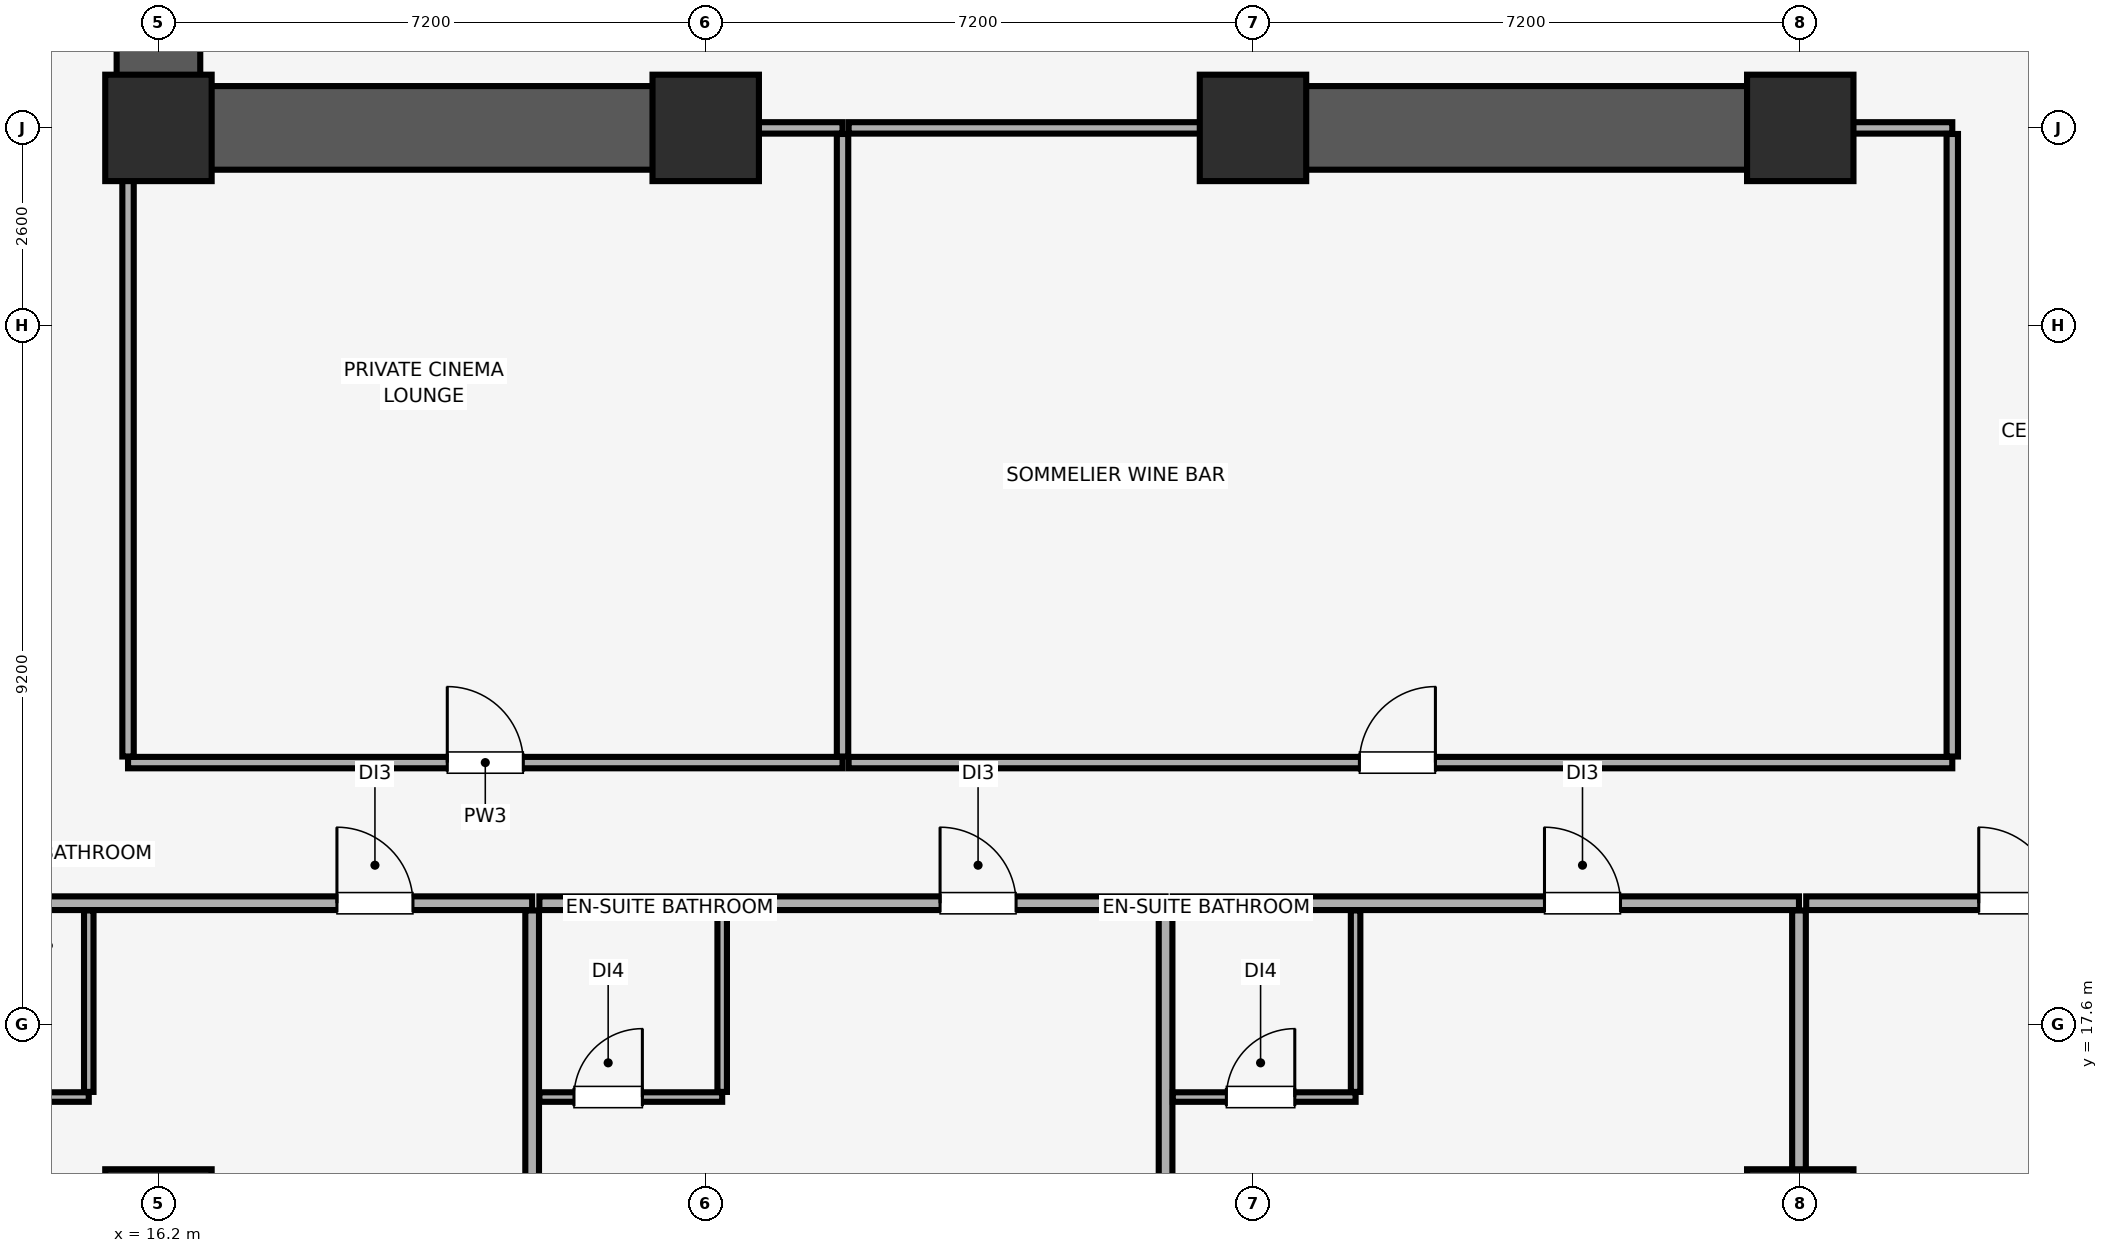
"""IFC4 building model, lengths in metres.
Left out: names, types, materials, properties, quantities, classifications, styles, units other than length and angle.
Written with IfcOpenShell. Run it as: python <this file> out.ifc"""

import sys

from ifc_helpers import new_model, si_unit, direction, frame, frame_2d, origin, origin_2d, place, context, subcontext, project, spatial, rectangle, extrude, element, fill, save


model = new_model("IFC4")
c1 = context("Model", 3, precision=1e-05, world=origin(), true_north=direction((0.0, 1.0)))
c2 = subcontext(c1, "Body", "Model", "MODEL_VIEW")
j1 = project(units=[si_unit("LENGTHUNIT", "METRE"), si_unit("PLANEANGLEUNIT", "RADIAN")], contexts=[c1])
p1 = place(None, origin())
s1 = spatial("IfcSite", under=j1, at=p1, CompositionType="ELEMENT")
p2 = place(p1, origin())
s2 = spatial("IfcBuilding", under=s1, at=p2, CompositionType="ELEMENT")
p3 = place(p2, frame((0.0, 0.0, 72.65)))
s3 = spatial("IfcBuildingStorey", under=s2, at=p3, CompositionType="ELEMENT", Elevation=72.65)
for number, where, z_axis, x_axis in (
    (1, (16.2, 15.0, 0.0), (0.0, 0.0, 1.0), (1.0, 0.0, 0.0)),
    (2, (37.8, 15.0, 0.0), (0.0, 0.0, 1.0), (1.0, 0.0, 0.0)),
    (3, (16.2, 29.4, 0.0), (0.0, 0.0, 1.0), (1.0, 0.0, 0.0)),
    (4, (23.4, 29.4, 0.0), (0.0, 0.0, 1.0), (1.0, 0.0, 0.0)),
    (5, (30.6, 29.4, 0.0), (0.0, 0.0, 1.0), (1.0, 0.0, 0.0)),
    (6, (37.8, 29.4, 0.0), (0.0, 0.0, 1.0), (1.0, 0.0, 0.0)),
):
    element("IfcColumn", number, at=place(p3, frame(where, z_axis=z_axis, x_axis=x_axis)), inside=s3, PredefinedType="COLUMN", context=c2, shape_type="SweptSolid", body=[
        extrude(rectangle(XDim=1.4, YDim=1.4, at=origin_2d()), origin(), (0.0, 0.0, 1.0), 3.51),
    ])
p4 = place(p3, frame((16.2, 29.4, 0.0), z_axis=(0.0, 0.0, 1.0), x_axis=(0.0, 1.0, 0.0)))
e7 = element("IfcWall", 7, at=p4, inside=s3, PredefinedType="SHEAR", context=c2, shape_type="SweptSolid", body=[
    extrude(rectangle(XDim=19.2, YDim=1.1, at=frame_2d((9.6, 0.0))), origin(), (0.0, 0.0, 1.0), 3.51),
])
p5 = place(p3, frame((16.755, 29.4, 0.0), z_axis=(0.0, 0.0, 1.0), x_axis=(1.0, 0.0, 0.0)))
e8 = element("IfcWall", 8, at=p5, inside=s3, PredefinedType="SHEAR", context=c2, shape_type="SweptSolid", body=[
    extrude(rectangle(XDim=6.845, YDim=1.1, at=frame_2d((3.423, 0.0))), origin(), (0.0, 0.0, 1.0), 3.51),
])
p6 = place(p3, frame((30.4, 29.4, 0.0), z_axis=(0.0, 0.0, 1.0), x_axis=(1.0, 0.0, 0.0)))
e9 = element("IfcWall", 9, at=p6, inside=s3, PredefinedType="SHEAR", context=c2, shape_type="SweptSolid", body=[
    extrude(rectangle(XDim=7.6, YDim=1.1, at=frame_2d((3.8, 0.0))), origin(), (0.0, 0.0, 1.0), 3.51),
])
p7 = place(p3, frame((12.878, 19.2, 0.0), z_axis=(0.0, 0.0, 1.0), x_axis=(1.0, 0.0, 0.0)))
e10 = element("IfcWall", 10, at=p7, inside=s3, PredefinedType="PARTITIONING", context=c2, shape_type="SweptSolid", body=[
    extrude(rectangle(XDim=8.238, YDim=0.18, at=frame_2d((4.119, 0.0))), origin(), (0.0, 0.0, 1.0), 3.51),
])
p8 = place(p7, frame((5.67, 0.0, 0.0)))
e11 = element("IfcOpeningElement", 11, at=p8, cuts=e10, PredefinedType="OPENING", context=c2, shape_type="SweptSolid", body=[
    extrude(rectangle(XDim=1.0, YDim=2.15, at=frame_2d((0.5, 1.075))), frame((0.0, 0.1, 0.0), z_axis=(0.0, -1.0, 0.0), x_axis=(1.0, 0.0, 0.0)), (0.0, 0.0, 1.0), 0.2),
])
p9 = place(p3, frame((21.117, 0.15, 0.0), z_axis=(0.0, 0.0, 1.0), x_axis=(0.0, 1.0, 0.0)))
e12 = element("IfcWall", 12, at=p9, inside=s3, PredefinedType="PARTITIONING", context=c2, shape_type="SweptSolid", body=[
    extrude(rectangle(XDim=18.955, YDim=0.18, at=frame_2d((9.478, 0.0))), origin(), (0.0, 0.0, 1.0), 3.51),
])
p10 = place(p3, frame((12.878, 16.65, 0.0), z_axis=(0.0, 0.0, 1.0), x_axis=(1.0, 0.0, 0.0)))
e13 = element("IfcWall", 13, at=p10, inside=s3, PredefinedType="PARTITIONING", context=c2, shape_type="SweptSolid", body=[
    extrude(rectangle(XDim=2.405, YDim=0.125, at=frame_2d((1.202, 0.0))), origin(), (0.0, 0.0, 1.0), 3.51),
])
p11 = place(p10, frame((0.705, 0.0, 0.0)))
e14 = element("IfcOpeningElement", 14, at=p11, cuts=e13, PredefinedType="OPENING", context=c2, shape_type="SweptSolid", body=[
    extrude(rectangle(XDim=0.9, YDim=2.1, at=frame_2d((0.45, 1.05))), frame((0.0, 0.073, 0.0), z_axis=(0.0, -1.0, 0.0), x_axis=(1.0, 0.0, 0.0)), (0.0, 0.0, 1.0), 0.145),
])
p12 = place(p3, frame((15.283, 16.718, 0.0), z_axis=(0.0, 0.0, 1.0), x_axis=(0.0, 1.0, 0.0)))
e15 = element("IfcWall", 15, at=p12, inside=s3, PredefinedType="PARTITIONING", context=c2, shape_type="SweptSolid", body=[
    extrude(rectangle(XDim=2.387, YDim=0.125, at=frame_2d((1.194, 0.0))), origin(), (0.0, 0.0, 1.0), 3.51),
])
p13 = place(p3, frame((21.212, 19.2, 0.0), z_axis=(0.0, 0.0, 1.0), x_axis=(1.0, 0.0, 0.0)))
e16 = element("IfcWall", 16, at=p13, inside=s3, PredefinedType="PARTITIONING", context=c2, shape_type="SweptSolid", body=[
    extrude(rectangle(XDim=8.238, YDim=0.18, at=frame_2d((4.119, 0.0))), origin(), (0.0, 0.0, 1.0), 3.51),
])
p14 = place(p13, frame((5.271, 0.0, 0.0)))
e17 = element("IfcOpeningElement", 17, at=p14, cuts=e16, PredefinedType="OPENING", context=c2, shape_type="SweptSolid", body=[
    extrude(rectangle(XDim=1.0, YDim=2.15, at=frame_2d((0.5, 1.075))), frame((0.0, 0.1, 0.0), z_axis=(0.0, -1.0, 0.0), x_axis=(1.0, 0.0, 0.0)), (0.0, 0.0, 1.0), 0.2),
])
p15 = place(p3, frame((29.45, 0.15, 0.0), z_axis=(0.0, 0.0, 1.0), x_axis=(0.0, 1.0, 0.0)))
e18 = element("IfcWall", 18, at=p15, inside=s3, PredefinedType="PARTITIONING", context=c2, shape_type="SweptSolid", body=[
    extrude(rectangle(XDim=18.955, YDim=0.18, at=frame_2d((9.478, 0.0))), origin(), (0.0, 0.0, 1.0), 3.51),
])
p16 = place(p3, frame((21.212, 16.65, 0.0), z_axis=(0.0, 0.0, 1.0), x_axis=(1.0, 0.0, 0.0)))
e19 = element("IfcWall", 19, at=p16, inside=s3, PredefinedType="PARTITIONING", context=c2, shape_type="SweptSolid", body=[
    extrude(rectangle(XDim=2.405, YDim=0.125, at=frame_2d((1.203, 0.0))), origin(), (0.0, 0.0, 1.0), 3.51),
])
p17 = place(p16, frame((0.455, 0.0, 0.0)))
e20 = element("IfcOpeningElement", 20, at=p17, cuts=e19, PredefinedType="OPENING", context=c2, shape_type="SweptSolid", body=[
    extrude(rectangle(XDim=0.9, YDim=2.1, at=frame_2d((0.45, 1.05))), frame((0.0, 0.073, 0.0), z_axis=(0.0, -1.0, 0.0), x_axis=(1.0, 0.0, 0.0)), (0.0, 0.0, 1.0), 0.145),
])
p18 = place(p3, frame((23.617, 16.718, 0.0), z_axis=(0.0, 0.0, 1.0), x_axis=(0.0, 1.0, 0.0)))
e21 = element("IfcWall", 21, at=p18, inside=s3, PredefinedType="PARTITIONING", context=c2, shape_type="SweptSolid", body=[
    extrude(rectangle(XDim=2.387, YDim=0.125, at=frame_2d((1.194, 0.0))), origin(), (0.0, 0.0, 1.0), 2.977),
])
p19 = place(p3, frame((29.545, 19.2, 0.0), z_axis=(0.0, 0.0, 1.0), x_axis=(1.0, 0.0, 0.0)))
e22 = element("IfcWall", 22, at=p19, inside=s3, PredefinedType="PARTITIONING", context=c2, shape_type="SweptSolid", body=[
    extrude(rectangle(XDim=8.238, YDim=0.18, at=frame_2d((4.119, 0.0))), origin(), (0.0, 0.0, 1.0), 3.51),
])
p20 = place(p19, frame((4.89, 0.0, 0.0)))
e23 = element("IfcOpeningElement", 23, at=p20, cuts=e22, PredefinedType="OPENING", context=c2, shape_type="SweptSolid", body=[
    extrude(rectangle(XDim=1.0, YDim=2.15, at=frame_2d((0.5, 1.075))), frame((0.0, 0.1, 0.0), z_axis=(0.0, -1.0, 0.0), x_axis=(1.0, 0.0, 0.0)), (0.0, 0.0, 1.0), 0.2),
])
p21 = place(p3, frame((37.783, 0.15, 0.0), z_axis=(0.0, 0.0, 1.0), x_axis=(0.0, 1.0, 0.0)))
e24 = element("IfcWall", 24, at=p21, inside=s3, PredefinedType="PARTITIONING", context=c2, shape_type="SweptSolid", body=[
    extrude(rectangle(XDim=18.955, YDim=0.18, at=frame_2d((9.478, 0.0))), origin(), (0.0, 0.0, 1.0), 2.898),
])
p22 = place(p3, frame((29.545, 16.65, 0.0), z_axis=(0.0, 0.0, 1.0), x_axis=(1.0, 0.0, 0.0)))
e25 = element("IfcWall", 25, at=p22, inside=s3, PredefinedType="PARTITIONING", context=c2, shape_type="SweptSolid", body=[
    extrude(rectangle(XDim=2.405, YDim=0.125, at=frame_2d((1.203, 0.0))), origin(), (0.0, 0.0, 1.0), 3.51),
])
p23 = place(p22, frame((0.705, 0.0, 0.0)))
e26 = element("IfcOpeningElement", 26, at=p23, cuts=e25, PredefinedType="OPENING", context=c2, shape_type="SweptSolid", body=[
    extrude(rectangle(XDim=0.9, YDim=2.1, at=frame_2d((0.45, 1.05))), frame((0.0, 0.073, 0.0), z_axis=(0.0, -1.0, 0.0), x_axis=(1.0, 0.0, 0.0)), (0.0, 0.0, 1.0), 0.145),
])
p24 = place(p3, frame((31.95, 16.718, 0.0), z_axis=(0.0, 0.0, 1.0), x_axis=(0.0, 1.0, 0.0)))
e27 = element("IfcWall", 27, at=p24, inside=s3, PredefinedType="PARTITIONING", context=c2, shape_type="SweptSolid", body=[
    extrude(rectangle(XDim=2.387, YDim=0.125, at=frame_2d((1.194, 0.0))), origin(), (0.0, 0.0, 1.0), 3.51),
])
p25 = place(p3, frame((37.878, 19.2, 0.0), z_axis=(0.0, 0.0, 1.0), x_axis=(1.0, 0.0, 0.0)))
e28 = element("IfcWall", 28, at=p25, inside=s3, PredefinedType="PARTITIONING", context=c2, shape_type="SweptSolid", body=[
    extrude(rectangle(XDim=8.238, YDim=0.18, at=frame_2d((4.119, 0.0))), origin(), (0.0, 0.0, 1.0), 3.51),
])
p26 = place(p25, frame((2.27, 0.0, 0.0)))
e29 = element("IfcOpeningElement", 29, at=p26, cuts=e28, PredefinedType="OPENING", context=c2, shape_type="SweptSolid", body=[
    extrude(rectangle(XDim=1.0, YDim=2.15, at=frame_2d((0.5, 1.075))), frame((0.0, 0.1, 0.0), z_axis=(0.0, -1.0, 0.0), x_axis=(1.0, 0.0, 0.0)), (0.0, 0.0, 1.0), 0.2),
])
p27 = place(p3, frame((15.8, 21.05, 0.0), z_axis=(0.0, 0.0, 1.0), x_axis=(1.0, 0.0, 0.0)))
e30 = element("IfcWall", 30, at=p27, inside=s3, PredefinedType="PARTITIONING", context=c2, shape_type="SweptSolid", body=[
    extrude(rectangle(XDim=9.4, YDim=0.15, at=frame_2d((4.7, 0.0))), origin(), (0.0, 0.0, 1.0), 3.51),
])
p28 = place(p27, frame((4.2, 0.0, 0.0)))
e31 = element("IfcOpeningElement", 31, at=p28, cuts=e30, PredefinedType="OPENING", context=c2, shape_type="SweptSolid", body=[
    extrude(rectangle(XDim=1.0, YDim=2.15, at=frame_2d((0.5, 1.075))), frame((0.0, 0.085, 0.0), z_axis=(0.0, -1.0, 0.0), x_axis=(1.0, 0.0, 0.0)), (0.0, 0.0, 1.0), 0.17),
])
p29 = place(p3, frame((23.61, 29.4, 0.0), z_axis=(0.0, 0.0, 1.0), x_axis=(1.0, 0.0, 0.0)))
e32 = element("IfcWall", 32, at=p29, inside=s3, PredefinedType="PARTITIONING", context=c2, shape_type="SweptSolid", body=[
    extrude(rectangle(XDim=1.59, YDim=0.15, at=frame_2d((0.795, 0.0))), origin(), (0.0, 0.0, 1.0), 2.41),
])
p30 = place(p3, frame((15.8, 21.13, 0.0), z_axis=(0.0, 0.0, 1.0), x_axis=(0.0, 1.0, 0.0)))
e33 = element("IfcWall", 33, at=p30, inside=s3, PredefinedType="PARTITIONING", context=c2, shape_type="SweptSolid", body=[
    extrude(rectangle(XDim=8.26, YDim=0.15, at=frame_2d((4.13, 0.0))), origin(), (0.0, 0.0, 1.0), 3.51),
])
p31 = place(p3, frame((25.2, 21.13, 0.0), z_axis=(0.0, 0.0, 1.0), x_axis=(0.0, 1.0, 0.0)))
e34 = element("IfcWall", 34, at=p31, inside=s3, PredefinedType="PARTITIONING", context=c2, shape_type="SweptSolid", body=[
    extrude(rectangle(XDim=8.19, YDim=0.15, at=frame_2d((4.095, 0.0))), origin(), (0.0, 0.0, 1.0), 3.51),
])
p32 = place(p3, frame((25.28, 21.05, 0.0), z_axis=(0.0, 0.0, 1.0), x_axis=(1.0, 0.0, 0.0)))
e35 = element("IfcWall", 35, at=p32, inside=s3, PredefinedType="PARTITIONING", context=c2, shape_type="SweptSolid", body=[
    extrude(rectangle(XDim=14.52, YDim=0.15, at=frame_2d((7.26, 0.0))), origin(), (0.0, 0.0, 1.0), 3.51),
])
p33 = place(p32, frame((6.72, 0.0, 0.0)))
e36 = element("IfcOpeningElement", 36, at=p33, cuts=e35, PredefinedType="OPENING", context=c2, shape_type="SweptSolid", body=[
    extrude(rectangle(XDim=1.0, YDim=2.15, at=frame_2d((0.5, 1.075))), frame((0.0, 0.085, 0.0), z_axis=(0.0, -1.0, 0.0), x_axis=(1.0, 0.0, 0.0)), (0.0, 0.0, 1.0), 0.17),
])
p34 = place(p3, frame((25.28, 29.4, 0.0), z_axis=(0.0, 0.0, 1.0), x_axis=(1.0, 0.0, 0.0)))
e37 = element("IfcWall", 37, at=p34, inside=s3, PredefinedType="PARTITIONING", context=c2, shape_type="SweptSolid", body=[
    extrude(rectangle(XDim=5.11, YDim=0.15, at=frame_2d((2.555, 0.0))), origin(), (0.0, 0.0, 1.0), 2.41),
])
p35 = place(p3, frame((38.01, 29.4, 0.0), z_axis=(0.0, 0.0, 1.0), x_axis=(1.0, 0.0, 0.0)))
e38 = element("IfcWall", 38, at=p35, inside=s3, PredefinedType="PARTITIONING", context=c2, shape_type="SweptSolid", body=[
    extrude(rectangle(XDim=1.79, YDim=0.15, at=frame_2d((0.895, 0.0))), origin(), (0.0, 0.0, 1.0), 2.41),
])
p36 = place(p3, frame((39.8, 21.13, 0.0), z_axis=(0.0, 0.0, 1.0), x_axis=(0.0, 1.0, 0.0)))
e39 = element("IfcWall", 39, at=p36, inside=s3, PredefinedType="PARTITIONING", context=c2, shape_type="SweptSolid", body=[
    extrude(rectangle(XDim=8.19, YDim=0.15, at=frame_2d((4.095, 0.0))), origin(), (0.0, 0.0, 1.0), 3.51),
])
p37 = place(p8, origin())
e40 = element("IfcDoor", 40, at=p37, inside=s3, OperationType="SINGLE_SWING_LEFT", PredefinedType="DOOR", context=c2, shape_type="SweptSolid", body=[
    extrude(rectangle(XDim=1.0, YDim=2.15, at=frame_2d((0.5, 1.075))), frame((0.0, 0.025, 0.0), z_axis=(0.0, -1.0, 0.0), x_axis=(1.0, 0.0, 0.0)), (0.0, 0.0, 1.0), 0.05),
])
fill(e11, e40)
p38 = place(p14, origin())
e41 = element("IfcDoor", 41, at=p38, inside=s3, OperationType="SINGLE_SWING_LEFT", PredefinedType="DOOR", context=c2, shape_type="SweptSolid", body=[
    extrude(rectangle(XDim=1.0, YDim=2.15, at=frame_2d((0.5, 1.075))), frame((0.0, 0.025, 0.0), z_axis=(0.0, -1.0, 0.0), x_axis=(1.0, 0.0, 0.0)), (0.0, 0.0, 1.0), 0.05),
])
fill(e17, e41)
p39 = place(p17, origin())
e42 = element("IfcDoor", 42, at=p39, inside=s3, OperationType="SINGLE_SWING_RIGHT", PredefinedType="DOOR", context=c2, shape_type="SweptSolid", body=[
    extrude(rectangle(XDim=0.9, YDim=2.1, at=frame_2d((0.45, 1.05))), frame((0.0, 0.025, 0.0), z_axis=(0.0, -1.0, 0.0), x_axis=(1.0, 0.0, 0.0)), (0.0, 0.0, 1.0), 0.05),
])
fill(e20, e42)
p40 = place(p20, origin())
e43 = element("IfcDoor", 43, at=p40, inside=s3, OperationType="SINGLE_SWING_LEFT", PredefinedType="DOOR", context=c2, shape_type="SweptSolid", body=[
    extrude(rectangle(XDim=1.0, YDim=2.15, at=frame_2d((0.5, 1.075))), frame((0.0, 0.025, 0.0), z_axis=(0.0, -1.0, 0.0), x_axis=(1.0, 0.0, 0.0)), (0.0, 0.0, 1.0), 0.05),
])
fill(e23, e43)
p41 = place(p23, origin())
e44 = element("IfcDoor", 44, at=p41, inside=s3, OperationType="SINGLE_SWING_RIGHT", PredefinedType="DOOR", context=c2, shape_type="SweptSolid", body=[
    extrude(rectangle(XDim=0.9, YDim=2.1, at=frame_2d((0.45, 1.05))), frame((0.0, 0.025, 0.0), z_axis=(0.0, -1.0, 0.0), x_axis=(1.0, 0.0, 0.0)), (0.0, 0.0, 1.0), 0.05),
])
fill(e26, e44)
p42 = place(p26, origin())
e45 = element("IfcDoor", 45, at=p42, inside=s3, OperationType="SINGLE_SWING_LEFT", PredefinedType="DOOR", context=c2, shape_type="SweptSolid", body=[
    extrude(rectangle(XDim=1.0, YDim=2.15, at=frame_2d((0.5, 1.075))), frame((0.0, 0.025, 0.0), z_axis=(0.0, -1.0, 0.0), x_axis=(1.0, 0.0, 0.0)), (0.0, 0.0, 1.0), 0.05),
])
fill(e29, e45)
p43 = place(p28, origin())
e46 = element("IfcDoor", 46, at=p43, inside=s3, OperationType="SINGLE_SWING_LEFT", PredefinedType="DOOR", context=c2, shape_type="SweptSolid", body=[
    extrude(rectangle(XDim=1.0, YDim=2.15, at=frame_2d((0.5, 1.075))), frame((0.0, 0.025, 0.0), z_axis=(0.0, -1.0, 0.0), x_axis=(1.0, 0.0, 0.0)), (0.0, 0.0, 1.0), 0.05),
])
fill(e31, e46)
p44 = place(p33, origin())
e47 = element("IfcDoor", 47, at=p44, inside=s3, OperationType="SINGLE_SWING_RIGHT", PredefinedType="DOOR", context=c2, shape_type="SweptSolid", body=[
    extrude(rectangle(XDim=1.0, YDim=2.15, at=frame_2d((0.5, 1.075))), frame((0.0, 0.025, 0.0), z_axis=(0.0, -1.0, 0.0), x_axis=(1.0, 0.0, 0.0)), (0.0, 0.0, 1.0), 0.05),
])
fill(e36, e47)
save(model, sys.argv[1])
